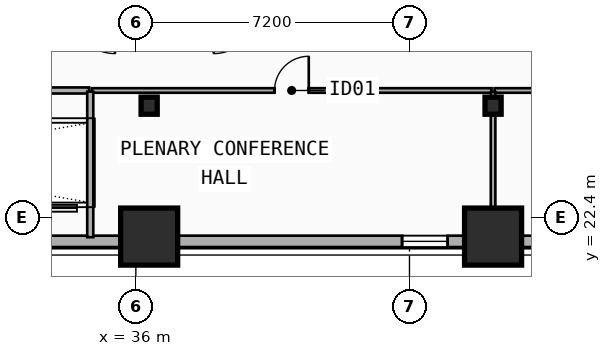
"""IFC4 building model, lengths in metres.
Left out: names, types, materials, properties, quantities, classifications, styles, units other than length and angle.
Written with IfcOpenShell. Run it as: python <this file> out.ifc"""

import sys

from ifc_helpers import new_model, si_unit, direction, frame, frame_2d, origin, origin_2d, place, context, subcontext, project, spatial, rectangle, i_section, extrude, element, fill, save


model = new_model("IFC4")
c1 = context("Model", 3, precision=1e-05, world=origin(), true_north=direction((0.0, 1.0)))
c2 = subcontext(c1, "Body", "Model", "MODEL_VIEW")
j1 = project(units=[si_unit("LENGTHUNIT", "METRE"), si_unit("PLANEANGLEUNIT", "RADIAN")], contexts=[c1])
p1 = place(None, origin())
s1 = spatial("IfcSite", under=j1, at=p1, CompositionType="ELEMENT")
p2 = place(p1, origin())
s2 = spatial("IfcBuilding", under=s1, at=p2, CompositionType="ELEMENT")
p3 = place(p2, frame((0.0, 0.0, 46.5)))
s3 = spatial("IfcBuildingStorey", under=s2, at=p3, CompositionType="ELEMENT", Elevation=46.5)
for number, where, z_axis, x_axis in (
    (1, (36.35, 25.35, 0.0), (0.0, 0.0, 1.0), (1.0, 0.0, 0.0)),
    (2, (45.4, 25.35, 0.0), (0.0, 0.0, 1.0), (1.0, 0.0, 0.0)),
):
    element("IfcColumn", number, at=place(p3, frame(where, z_axis=z_axis, x_axis=x_axis)), inside=s3, PredefinedType="COLUMN", context=c2, shape_type="SweptSolid", body=[
        extrude(i_section(OverallWidth=0.424, OverallDepth=0.45, WebThickness=0.041, FlangeThickness=0.065, FilletRadius=0.015, at=origin_2d()), origin(), (0.0, 0.0, 1.0), 3.5),
    ])
for number, where, z_axis, x_axis in (
    (3, (36.35, 22.014, 0.0), (0.0, -0.09, 0.996), (1.0, 0.0, 0.0)),
    (4, (45.4, 22.014, 0.0), (0.0, -0.09, 0.996), (1.0, 0.0, 0.0)),
):
    element("IfcColumn", number, at=place(p3, frame(where, z_axis=z_axis, x_axis=x_axis)), inside=s3, PredefinedType="COLUMN", context=c2, shape_type="SweptSolid", body=[
        extrude(rectangle(XDim=1.5, YDim=1.5, at=origin_2d()), origin(), (0.0, 0.0, 1.0), 3.514),
    ])
p4 = place(p3, frame((53.4, 21.78, 0.0), z_axis=(0.0, 0.0, 1.0), x_axis=(-1.0, 0.0, 0.0)))
e5 = element("IfcWall", 5, at=p4, inside=s3, PredefinedType="SOLIDWALL", context=c2, shape_type="SweptSolid", body=[
    extrude(rectangle(XDim=49.2, YDim=0.3, at=frame_2d((24.6, 0.0))), origin(), (0.0, 0.0, 1.0), 2.82),
])
p5 = place(p4, frame((46.896, 0.0, 0.65)))
e6 = element("IfcOpeningElement", 6, at=p5, cuts=e5, PredefinedType="OPENING", context=c2, shape_type="SweptSolid", body=[
    extrude(rectangle(XDim=1.8, YDim=1.8, at=frame_2d((0.9, 0.9))), frame((0.0, 0.16, 0.0), z_axis=(0.0, -1.0, 0.0), x_axis=(1.0, 0.0, 0.0)), (0.0, 0.0, 1.0), 0.32),
])
p6 = place(p4, frame((33.295, 0.0, 0.48)))
e7 = element("IfcOpeningElement", 7, at=p6, cuts=e5, PredefinedType="OPENING", context=c2, shape_type="SweptSolid", body=[
    extrude(rectangle(XDim=1.2, YDim=1.5, at=frame_2d((0.6, 0.75))), frame((0.0, 0.16, 0.0), z_axis=(0.0, -1.0, 0.0), x_axis=(1.0, 0.0, 0.0)), (0.0, 0.0, 1.0), 0.32),
])
p7 = place(p4, frame((9.195, 0.0, 0.34)))
e8 = element("IfcOpeningElement", 8, at=p7, cuts=e5, PredefinedType="OPENING", context=c2, shape_type="SweptSolid", body=[
    extrude(rectangle(XDim=1.2, YDim=1.5, at=frame_2d((0.6, 0.75))), frame((0.0, 0.16, 0.0), z_axis=(0.0, -1.0, 0.0), x_axis=(1.0, 0.0, 0.0)), (0.0, 0.0, 1.0), 0.32),
])
p8 = place(p4, frame((4.259, 0.0, 0.65)))
e9 = element("IfcOpeningElement", 9, at=p8, cuts=e5, PredefinedType="OPENING", context=c2, shape_type="SweptSolid", body=[
    extrude(rectangle(XDim=1.8, YDim=1.8, at=frame_2d((0.9, 0.9))), frame((0.0, 0.16, 0.0), z_axis=(0.0, -1.0, 0.0), x_axis=(1.0, 0.0, 0.0)), (0.0, 0.0, 1.0), 0.32),
])
p9 = place(p3, frame((34.84, 25.75, 0.0), z_axis=(0.0, 0.0, 1.0), x_axis=(1.0, 0.0, 0.0)))
e10 = element("IfcWall", 10, at=p9, inside=s3, PredefinedType="PARTITIONING", context=c2, shape_type="SweptSolid", body=[
    extrude(rectangle(XDim=10.52, YDim=0.12, at=frame_2d((5.26, 0.0))), origin(), (0.0, 0.0, 1.0), 2.28),
])
p10 = place(p9, frame((4.81, 0.0, 0.0)))
e11 = element("IfcOpeningElement", 11, at=p10, cuts=e10, PredefinedType="OPENING", context=c2, shape_type="SweptSolid", body=[
    extrude(rectangle(XDim=0.9, YDim=2.1, at=frame_2d((0.45, 1.05))), frame((0.0, 0.07, 0.0), z_axis=(0.0, -1.0, 0.0), x_axis=(1.0, 0.0, 0.0)), (0.0, 0.0, 1.0), 0.14),
])
p11 = place(p3, frame((45.44, 25.75, 0.0), z_axis=(0.0, 0.0, 1.0), x_axis=(1.0, 0.0, 0.0)))
e12 = element("IfcWall", 12, at=p11, inside=s3, PredefinedType="PARTITIONING", context=c2, shape_type="SweptSolid", body=[
    extrude(rectangle(XDim=11.9, YDim=0.12, at=frame_2d((5.95, 0.0))), origin(), (0.0, 0.0, 1.0), 2.28),
])
p12 = place(p11, frame((5.5, 0.0, 0.0)))
e13 = element("IfcOpeningElement", 13, at=p12, cuts=e12, PredefinedType="OPENING", context=c2, shape_type="SweptSolid", body=[
    extrude(rectangle(XDim=0.9, YDim=2.1, at=frame_2d((0.45, 1.05))), frame((0.0, 0.07, 0.0), z_axis=(0.0, -1.0, 0.0), x_axis=(1.0, 0.0, 0.0)), (0.0, 0.0, 1.0), 0.14),
])
p13 = place(p3, frame((45.4, 21.86, 0.0), z_axis=(0.0, 0.0, 1.0), x_axis=(0.0, 1.0, 0.0)))
e14 = element("IfcWall", 14, at=p13, inside=s3, PredefinedType="PARTITIONING", context=c2, shape_type="SweptSolid", body=[
    extrude(rectangle(XDim=3.85, YDim=0.12, at=frame_2d((1.925, 0.0))), origin(), (0.0, 0.0, 1.0), 2.28),
])
p14 = place(p3, frame((22.83, 25.75, 0.0), z_axis=(0.0, 0.0, 1.0), x_axis=(1.0, 0.0, 0.0)))
e15 = element("IfcWall", 15, at=p14, inside=s3, PredefinedType="PARTITIONING", context=c2, shape_type="SweptSolid", body=[
    extrude(rectangle(XDim=11.94, YDim=0.16, at=frame_2d((5.97, 0.0))), origin(), (0.0, 0.0, 1.0), 3.24),
])
p15 = place(p3, frame((34.8, 21.89, 0.0), z_axis=(0.0, 0.0, 1.0), x_axis=(0.0, 1.0, 0.0)))
e16 = element("IfcWall", 16, at=p15, inside=s3, PredefinedType="PARTITIONING", context=c2, shape_type="SweptSolid", body=[
    extrude(rectangle(XDim=3.83, YDim=0.16, at=frame_2d((1.915, 0.0))), origin(), (0.0, 0.0, 1.0), 2.82),
])
p16 = place(p7, origin())
e17 = element("IfcWindow", 17, at=p16, inside=s3, PartitioningType="SINGLE_PANEL", PredefinedType="WINDOW", context=c2, shape_type="SweptSolid", body=[
    extrude(rectangle(XDim=1.2, YDim=1.5, at=frame_2d((0.6, 0.75))), frame((0.0, 0.03, 0.0), z_axis=(0.0, -1.0, 0.0), x_axis=(1.0, 0.0, 0.0)), (0.0, 0.0, 1.0), 0.06),
])
fill(e8, e17)
p17 = place(p10, origin())
e18 = element("IfcDoor", 18, at=p17, inside=s3, OperationType="SINGLE_SWING_RIGHT", PredefinedType="DOOR", context=c2, shape_type="SweptSolid", body=[
    extrude(rectangle(XDim=0.9, YDim=2.1, at=frame_2d((0.45, 1.05))), frame((0.0, 0.025, 0.0), z_axis=(0.0, -1.0, 0.0), x_axis=(1.0, 0.0, 0.0)), (0.0, 0.0, 1.0), 0.05),
])
fill(e11, e18)
save(model, sys.argv[1])
